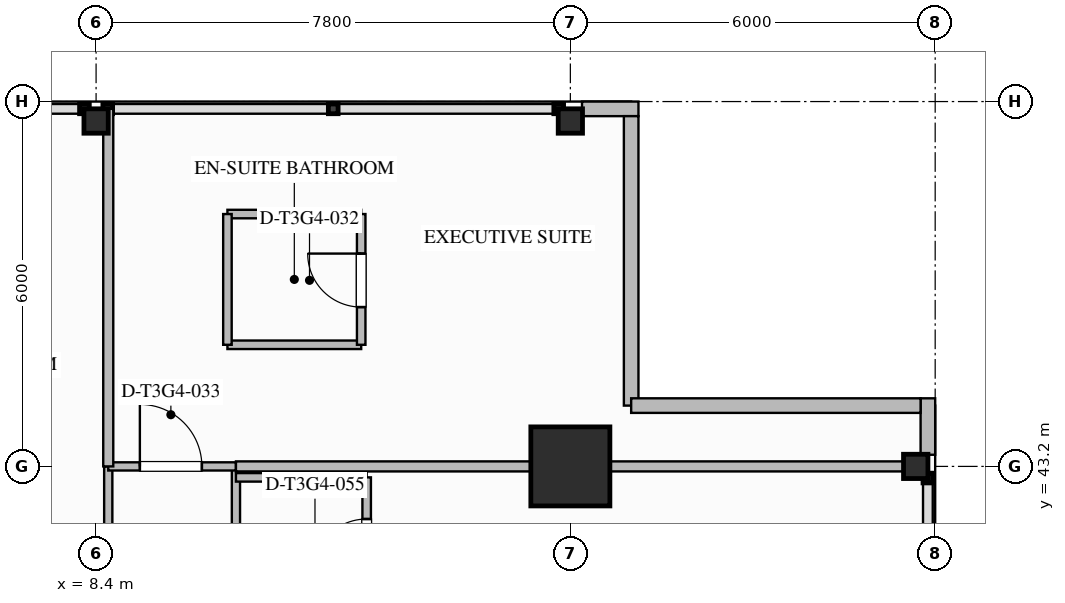
"""IFC4 building model, lengths in metres.
Left out: names, types, materials, properties, quantities, classifications, styles, units other than length and angle.
Written with IfcOpenShell. Run it as: python <this file> out.ifc"""

import sys

from ifc_helpers import new_model, si_unit, direction, frame, frame_2d, origin, origin_2d, place, context, subcontext, project, spatial, rectangle, i_section, extrude, element, fill, save


model = new_model("IFC4")
c1 = context("Model", 3, precision=1e-05, world=origin(), true_north=direction((0.0, 1.0)))
c2 = subcontext(c1, "Body", "Model", "MODEL_VIEW")
j1 = project(units=[si_unit("LENGTHUNIT", "METRE"), si_unit("PLANEANGLEUNIT", "RADIAN")], contexts=[c1])
p1 = place(None, origin())
s1 = spatial("IfcSite", under=j1, at=p1, CompositionType="ELEMENT")
p2 = place(p1, origin())
s2 = spatial("IfcBuilding", under=s1, at=p2, CompositionType="ELEMENT")
p3 = place(p2, frame((0.0, 0.0, 182.35)))
s3 = spatial("IfcBuildingStorey", under=s2, at=p3, CompositionType="ELEMENT", Elevation=182.35)
p4 = place(p3, frame((16.2, 43.2, 0.0), z_axis=(0.0, 0.0, 1.0), x_axis=(1.0, 0.0, 0.0)))
e1 = element("IfcColumn", 1, at=p4, inside=s3, PredefinedType="COLUMN", context=c2, shape_type="SweptSolid", body=[
    extrude(rectangle(XDim=1.3, YDim=1.3, at=origin_2d()), origin(), (0.0, 0.0, 1.0), 3.55),
])
for number, where, z_axis, x_axis in (
    (2, (21.88, 43.2, 0.0), (0.0, 0.0, 1.0), (1.0, 0.0, 0.0)),
    (3, (8.4, 48.88, 0.0), (0.0, 0.0, 1.0), (0.0, 1.0, 0.0)),
    (4, (16.2, 48.88, 0.0), (0.0, 0.0, 1.0), (0.0, 1.0, 0.0)),
):
    element("IfcColumn", number, at=place(p3, frame(where, z_axis=z_axis, x_axis=x_axis)), inside=s3, PredefinedType="COLUMN", context=c2, shape_type="SweptSolid", body=[
        extrude(i_section(OverallWidth=0.401, OverallDepth=0.399, WebThickness=0.025, FlangeThickness=0.04, FilletRadius=0.025, at=origin_2d()), origin(), (0.0, 0.0, 1.0), 3.547),
    ])
for number, where, z_axis, x_axis in (
    (5, (22.08, 44.32, 0.0), (0.0, 0.0, 1.0), (0.0, -1.0, 0.0)),
    (6, (16.392, 49.08, 0.0), (0.0, 0.0, 1.0), (1.0, 0.0, 0.0)),
):
    element("IfcWall", number, at=place(p3, frame(where, z_axis=z_axis, x_axis=x_axis)), inside=s3, PredefinedType="STANDARD", context=c2, shape_type="SweptSolid", body=[
        extrude(rectangle(XDim=0.928, YDim=0.24, at=frame_2d((0.464, 0.0))), origin(), (0.0, 0.0, 1.0), 3.29),
    ])
for number, where, z_axis, x_axis in (
    (7, (17.2, 48.96, 0.0), (0.0, 0.0, 1.0), (0.0, -1.0, 0.0)),
    (8, (17.2, 44.2, 0.0), (0.0, 0.0, 1.0), (1.0, 0.0, 0.0)),
):
    element("IfcWall", number, at=place(p3, frame(where, z_axis=z_axis, x_axis=x_axis)), inside=s3, PredefinedType="STANDARD", context=c2, shape_type="SweptSolid", body=[
        extrude(rectangle(XDim=4.76, YDim=0.24, at=frame_2d((2.38, 0.0))), origin(), (0.0, 0.0, 1.0), 3.29),
    ])
p5 = place(p3, frame((8.6, 38.55, 0.0), z_axis=(0.0, 0.0, 1.0), x_axis=(0.0, 1.0, 0.0)))
e9 = element("IfcWall", 9, at=p5, inside=s3, PredefinedType="PARTITIONING", context=c2, shape_type="SweptSolid", body=[
    extrude(rectangle(XDim=4.65, YDim=0.135, at=frame_2d((2.325, 0.0))), origin(), (0.0, 0.0, 1.0), 2.667),
])
p6 = place(p3, frame((10.7, 10.8, 0.0), z_axis=(0.0, 0.0, 1.0), x_axis=(0.0, 1.0, 0.0)))
e10 = element("IfcWall", 10, at=p6, inside=s3, PredefinedType="PARTITIONING", context=c2, shape_type="SweptSolid", body=[
    extrude(rectangle(XDim=32.4, YDim=0.135, at=frame_2d((16.2, 0.0))), origin(), (0.0, 0.0, 1.0), 3.29),
])
p7 = place(p6, frame((5.685, 0.0, 0.0)))
e11 = element("IfcOpeningElement", 11, at=p7, cuts=e10, PredefinedType="OPENING", context=c2, shape_type="SweptSolid", body=[
    extrude(rectangle(XDim=1.26, YDim=2.2, at=frame_2d((0.63, 1.1))), frame((0.0, 0.077, 0.0), z_axis=(0.0, -1.0, 0.0), x_axis=(1.0, 0.0, 0.0)), (0.0, 0.0, 1.0), 0.155),
])
p8 = place(p6, frame((11.655, 0.0, 0.0)))
e12 = element("IfcOpeningElement", 12, at=p8, cuts=e10, PredefinedType="OPENING", context=c2, shape_type="SweptSolid", body=[
    extrude(rectangle(XDim=1.26, YDim=2.2, at=frame_2d((0.63, 1.1))), frame((0.0, 0.077, 0.0), z_axis=(0.0, -1.0, 0.0), x_axis=(1.0, 0.0, 0.0)), (0.0, 0.0, 1.0), 0.155),
])
p9 = place(p6, frame((21.885, 0.0, 0.0)))
e13 = element("IfcOpeningElement", 13, at=p9, cuts=e10, PredefinedType="OPENING", context=c2, shape_type="SweptSolid", body=[
    extrude(rectangle(XDim=1.26, YDim=2.2, at=frame_2d((0.63, 1.1))), frame((0.0, 0.077, 0.0), z_axis=(0.0, -1.0, 0.0), x_axis=(1.0, 0.0, 0.0)), (0.0, 0.0, 1.0), 0.155),
])
p10 = place(p6, frame((27.255, 0.0, 0.0)))
e14 = element("IfcOpeningElement", 14, at=p10, cuts=e10, PredefinedType="OPENING", context=c2, shape_type="SweptSolid", body=[
    extrude(rectangle(XDim=1.26, YDim=2.2, at=frame_2d((0.63, 1.1))), frame((0.0, 0.077, 0.0), z_axis=(0.0, -1.0, 0.0), x_axis=(1.0, 0.0, 0.0)), (0.0, 0.0, 1.0), 0.155),
])
p11 = place(p3, frame((8.6, 43.2, 0.0), z_axis=(0.0, 0.0, 1.0), x_axis=(1.0, 0.0, 0.0)))
e15 = element("IfcWall", 15, at=p11, inside=s3, PredefinedType="PARTITIONING", context=c2, shape_type="SweptSolid", body=[
    extrude(rectangle(XDim=2.1, YDim=0.135, at=frame_2d((1.05, 0.0))), origin(), (0.0, 0.0, 1.0), 2.579),
])
p12 = place(p11, frame((0.52, 0.0, 0.0)))
e16 = element("IfcOpeningElement", 16, at=p12, cuts=e15, PredefinedType="OPENING", context=c2, shape_type="SweptSolid", body=[
    extrude(rectangle(XDim=1.02, YDim=2.15, at=frame_2d((0.51, 1.075))), frame((0.0, 0.077, 0.0), z_axis=(0.0, -1.0, 0.0), x_axis=(1.0, 0.0, 0.0)), (0.0, 0.0, 1.0), 0.155),
])
p13 = place(p3, frame((8.6, 43.2, 0.0), z_axis=(0.0, 0.0, 1.0), x_axis=(0.0, 1.0, 0.0)))
e17 = element("IfcWall", 17, at=p13, inside=s3, PredefinedType="PARTITIONING", context=c2, shape_type="SweptSolid", body=[
    extrude(rectangle(XDim=5.88, YDim=0.165, at=frame_2d((2.94, 0.0))), origin(), (0.0, 0.0, 1.0), 2.579),
])
p14 = place(p3, frame((10.7, 43.2, 0.0), z_axis=(0.0, 0.0, 1.0), x_axis=(1.0, 0.0, 0.0)))
e18 = element("IfcWall", 18, at=p14, inside=s3, PredefinedType="PARTITIONING", context=c2, shape_type="SweptSolid", body=[
    extrude(rectangle(XDim=11.38, YDim=0.165, at=frame_2d((5.69, 0.0))), origin(), (0.0, 0.0, 1.0), 2.579),
])
for number, where, z_axis, x_axis in (
    (19, (10.56, 45.2, 0.0), (0.0, 0.0, 1.0), (1.0, 0.0, 0.0)),
    (20, (10.56, 47.35, 0.0), (0.0, 0.0, 1.0), (1.0, 0.0, 0.0)),
):
    element("IfcWall", number, at=place(p3, frame(where, z_axis=z_axis, x_axis=x_axis)), inside=s3, PredefinedType="PLUMBINGWALL", context=c2, shape_type="SweptSolid", body=[
        extrude(rectangle(XDim=2.2, YDim=0.14, at=frame_2d((1.1, 0.0))), origin(), (0.0, 0.0, 1.0), 3.29),
    ])
p15 = place(p3, frame((10.56, 45.2, 0.0), z_axis=(0.0, 0.0, 1.0), x_axis=(0.0, 1.0, 0.0)))
e21 = element("IfcWall", 21, at=p15, inside=s3, PredefinedType="PLUMBINGWALL", context=c2, shape_type="SweptSolid", body=[
    extrude(rectangle(XDim=2.15, YDim=0.14, at=frame_2d((1.075, 0.0))), origin(), (0.0, 0.0, 1.0), 3.29),
])
p16 = place(p3, frame((12.76, 45.2, 0.0), z_axis=(0.0, 0.0, 1.0), x_axis=(0.0, 1.0, 0.0)))
e22 = element("IfcWall", 22, at=p16, inside=s3, PredefinedType="PLUMBINGWALL", context=c2, shape_type="SweptSolid", body=[
    extrude(rectangle(XDim=2.15, YDim=0.14, at=frame_2d((1.075, 0.0))), origin(), (0.0, 0.0, 1.0), 3.29),
])
p17 = place(p16, frame((0.62, 0.0, 0.0)))
e23 = element("IfcOpeningElement", 23, at=p17, cuts=e22, PredefinedType="OPENING", context=c2, shape_type="SweptSolid", body=[
    extrude(rectangle(XDim=0.88, YDim=2.1, at=frame_2d((0.44, 1.05))), frame((0.0, 0.08, 0.0), z_axis=(0.0, -1.0, 0.0), x_axis=(1.0, 0.0, 0.0)), (0.0, 0.0, 1.0), 0.16),
])
p18 = place(p3, frame((10.7, 43.02, 0.0), z_axis=(0.0, 0.0, 1.0), x_axis=(1.0, 0.0, 0.0)))
e24 = element("IfcWall", 24, at=p18, inside=s3, PredefinedType="PLUMBINGWALL", context=c2, shape_type="SweptSolid", body=[
    extrude(rectangle(XDim=2.15, YDim=0.14, at=frame_2d((1.075, 0.0))), origin(), (0.0, 0.0, 1.0), 2.579),
])
p19 = place(p3, frame((12.85, 40.77, 0.0), z_axis=(0.0, 0.0, 1.0), x_axis=(0.0, 1.0, 0.0)))
e25 = element("IfcWall", 25, at=p19, inside=s3, PredefinedType="PLUMBINGWALL", context=c2, shape_type="SweptSolid", body=[
    extrude(rectangle(XDim=2.25, YDim=0.14, at=frame_2d((1.125, 0.0))), origin(), (0.0, 0.0, 1.0), 3.29),
])
p20 = place(p19, frame((0.685, 0.0, 0.0)))
e26 = element("IfcOpeningElement", 26, at=p20, cuts=e25, PredefinedType="OPENING", context=c2, shape_type="SweptSolid", body=[
    extrude(rectangle(XDim=0.88, YDim=2.1, at=frame_2d((0.44, 1.05))), frame((0.0, 0.08, 0.0), z_axis=(0.0, -1.0, 0.0), x_axis=(1.0, 0.0, 0.0)), (0.0, 0.0, 1.0), 0.16),
])
p21 = place(p17, origin())
e27 = element("IfcDoor", 27, at=p21, inside=s3, OperationType="SINGLE_SWING_RIGHT", PredefinedType="DOOR", context=c2, shape_type="SweptSolid", body=[
    extrude(rectangle(XDim=0.88, YDim=2.1, at=frame_2d((0.44, 1.05))), frame((0.0, 0.025, 0.0), z_axis=(0.0, -1.0, 0.0), x_axis=(1.0, 0.0, 0.0)), (0.0, 0.0, 1.0), 0.05),
])
fill(e23, e27)
p22 = place(p12, origin())
e28 = element("IfcDoor", 28, at=p22, inside=s3, OperationType="SINGLE_SWING_LEFT", PredefinedType="DOOR", context=c2, shape_type="SweptSolid", body=[
    extrude(rectangle(XDim=1.02, YDim=2.15, at=frame_2d((0.51, 1.075))), frame((0.0, 0.025, 0.0), z_axis=(0.0, -1.0, 0.0), x_axis=(1.0, 0.0, 0.0)), (0.0, 0.0, 1.0), 0.05),
])
fill(e16, e28)
p23 = place(p20, origin())
e29 = element("IfcDoor", 29, at=p23, inside=s3, OperationType="SINGLE_SWING_LEFT", PredefinedType="DOOR", context=c2, shape_type="SweptSolid", body=[
    extrude(rectangle(XDim=0.88, YDim=2.1, at=frame_2d((0.44, 1.05))), frame((0.0, 0.025, 0.0), z_axis=(0.0, -1.0, 0.0), x_axis=(1.0, 0.0, 0.0)), (0.0, 0.0, 1.0), 0.05),
])
fill(e26, e29)
save(model, sys.argv[1])
